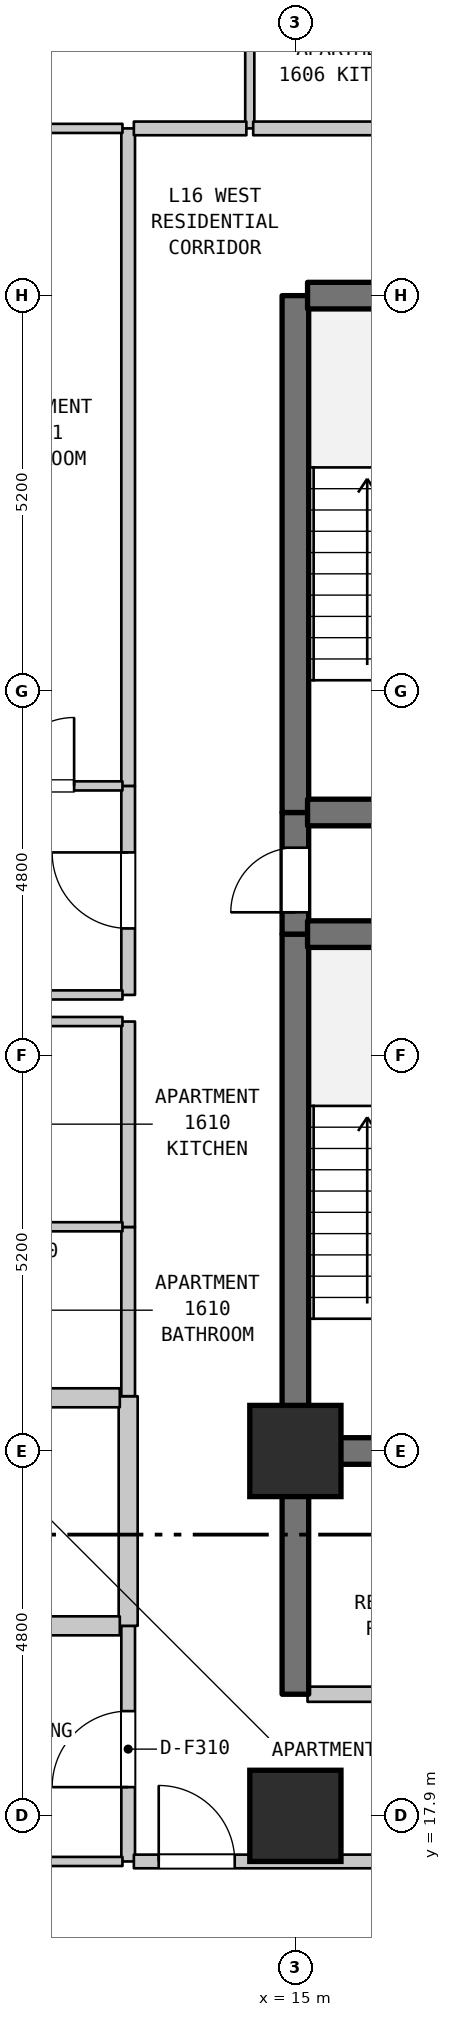
"""IFC4 building model, lengths in metres.
Left out: names, types, materials, properties, quantities, classifications, styles, units other than length and angle.
Written with IfcOpenShell. Run it as: python <this file> out.ifc"""

import sys

from ifc_helpers import new_model, si_unit, direction, frame, frame_2d, origin, origin_2d, place, context, subcontext, project, spatial, rectangle, extrude, element, fill, save


model = new_model("IFC4")
c1 = context("Model", 3, precision=1e-05, world=origin(), true_north=direction((0.0, 1.0)))
c2 = subcontext(c1, "Body", "Model", "MODEL_VIEW")
j1 = project(units=[si_unit("LENGTHUNIT", "METRE"), si_unit("PLANEANGLEUNIT", "RADIAN")], contexts=[c1])
p1 = place(None, origin())
s1 = spatial("IfcSite", under=j1, at=p1, CompositionType="ELEMENT")
p2 = place(p1, origin())
s2 = spatial("IfcBuilding", under=s1, at=p2, CompositionType="ELEMENT")
p3 = place(p2, frame((0.0, 0.0, 70.1)))
s3 = spatial("IfcBuildingStorey", under=s2, at=p3, CompositionType="ELEMENT", Elevation=70.1)
for number, where, z_axis, x_axis in (
    (1, (15.0, 17.9, 0.0), (0.0, 0.0, 1.0), (1.0, 0.0, 0.0)),
    (2, (15.0, 22.7, 0.0), (0.0, 0.0, 1.0), (1.0, 0.0, 0.0)),
):
    element("IfcColumn", number, at=place(p3, frame(where, z_axis=z_axis, x_axis=x_axis)), inside=s3, PredefinedType="COLUMN", context=c2, shape_type="SweptSolid", body=[
        extrude(rectangle(XDim=1.2, YDim=1.2, at=origin_2d()), origin(), (0.0, 0.0, 1.0), 3.7),
    ])
p4 = place(p3, frame((12.8, 17.3, 0.0), z_axis=(0.0, 0.0, 1.0), x_axis=(0.0, 1.0, 0.0)))
e3 = element("IfcWall", 3, at=p4, inside=s3, PredefinedType="STANDARD", context=c2, shape_type="SweptSolid", body=[
    extrude(rectangle(XDim=3.1, YDim=0.18, at=frame_2d((1.55, 0.0))), origin(), (0.0, 0.0, 1.0), 3.385),
])
p5 = place(p4, frame((0.978, 0.0, 0.0)))
e4 = element("IfcOpeningElement", 4, at=p5, cuts=e3, PredefinedType="OPENING", context=c2, shape_type="SweptSolid", body=[
    extrude(rectangle(XDim=1.0, YDim=2.15, at=frame_2d((0.5, 1.075))), frame((0.0, 0.1, 0.0), z_axis=(0.0, -1.0, 0.0), x_axis=(1.0, 0.0, 0.0)), (0.0, 0.0, 1.0), 0.2),
])
p6 = place(p3, frame((12.8, 20.4, 0.0), z_axis=(0.0, 0.0, 1.0), x_axis=(0.0, 1.0, 0.0)))
e5 = element("IfcWall", 5, at=p6, inside=s3, PredefinedType="STANDARD", context=c2, shape_type="SweptSolid", body=[
    extrude(rectangle(XDim=3.021, YDim=0.25, at=frame_2d((1.51, 0.0))), origin(), (0.0, 0.0, 1.0), 3.385),
])
p7 = place(p3, frame((12.8, 23.421, 0.0), z_axis=(0.0, 0.0, 1.0), x_axis=(0.0, 1.0, 0.0)))
e6 = element("IfcWall", 6, at=p7, inside=s3, PredefinedType="STANDARD", context=c2, shape_type="SweptSolid", body=[
    extrude(rectangle(XDim=2.226, YDim=0.18, at=frame_2d((1.113, 0.0))), origin(), (0.0, 0.0, 1.0), 3.385),
])
p8 = place(p3, frame((12.8, 25.647, 0.0), z_axis=(0.0, 0.0, 1.0), x_axis=(0.0, 1.0, 0.0)))
e7 = element("IfcWall", 7, at=p8, inside=s3, PredefinedType="STANDARD", context=c2, shape_type="SweptSolid", body=[
    extrude(rectangle(XDim=2.703, YDim=0.18, at=frame_2d((1.352, 0.0))), origin(), (0.0, 0.0, 1.0), 3.385),
])
p9 = place(p3, frame((12.8, 28.7, 0.0), z_axis=(0.0, 0.0, 1.0), x_axis=(0.0, 1.0, 0.0)))
e8 = element("IfcWall", 8, at=p9, inside=s3, PredefinedType="STANDARD", context=c2, shape_type="SweptSolid", body=[
    extrude(rectangle(XDim=2.75, YDim=0.18, at=frame_2d((1.375, 0.0))), origin(), (0.0, 0.0, 1.0), 3.385),
])
p10 = place(p9, frame((0.875, 0.0, 0.0)))
e9 = element("IfcOpeningElement", 9, at=p10, cuts=e8, PredefinedType="OPENING", context=c2, shape_type="SweptSolid", body=[
    extrude(rectangle(XDim=1.0, YDim=2.15, at=frame_2d((0.5, 1.075))), frame((0.0, 0.1, 0.0), z_axis=(0.0, -1.0, 0.0), x_axis=(1.0, 0.0, 0.0)), (0.0, 0.0, 1.0), 0.2),
])
p11 = place(p3, frame((12.8, 31.45, 0.0), z_axis=(0.0, 0.0, 1.0), x_axis=(0.0, 1.0, 0.0)))
e10 = element("IfcWall", 10, at=p11, inside=s3, PredefinedType="STANDARD", context=c2, shape_type="SweptSolid", body=[
    extrude(rectangle(XDim=8.65, YDim=0.18, at=frame_2d((4.325, 0.0))), origin(), (0.0, 0.0, 1.0), 3.385),
])
p12 = place(p3, frame((14.4, 40.1, 0.0), z_axis=(0.0, 0.0, 1.0), x_axis=(0.0, 1.0, 0.0)))
e11 = element("IfcWall", 11, at=p12, inside=s3, PredefinedType="PARTITIONING", context=c2, shape_type="SweptSolid", body=[
    extrude(rectangle(XDim=2.3, YDim=0.12, at=frame_2d((1.15, 0.0))), origin(), (0.0, 0.0, 1.0), 3.385),
])
p13 = place(p3, frame((15.0, 19.5, 0.0), z_axis=(0.0, 0.0, 1.0), x_axis=(0.0, 1.0, 0.0)))
e12 = element("IfcWall", 12, at=p13, inside=s3, PredefinedType="SHEAR", context=c2, shape_type="SweptSolid", body=[
    extrude(rectangle(XDim=3.2, YDim=0.35, at=frame_2d((1.6, 0.0))), origin(), (0.0, 0.0, 1.0), 3.385),
])
p14 = place(p3, frame((15.0, 22.7, 0.0), z_axis=(0.0, 0.0, 1.0), x_axis=(0.0, 1.0, 0.0)))
e13 = element("IfcWall", 13, at=p14, inside=s3, PredefinedType="SHEAR", context=c2, shape_type="SweptSolid", body=[
    extrude(rectangle(XDim=6.8, YDim=0.35, at=frame_2d((3.4, 0.0))), origin(), (0.0, 0.0, 1.0), 3.385),
])
p15 = place(p3, frame((15.0, 29.5, 0.0), z_axis=(0.0, 0.0, 1.0), x_axis=(0.0, 1.0, 0.0)))
e14 = element("IfcWall", 14, at=p15, inside=s3, PredefinedType="SHEAR", context=c2, shape_type="SweptSolid", body=[
    extrude(rectangle(XDim=1.6, YDim=0.35, at=frame_2d((0.8, 0.0))), origin(), (0.0, 0.0, 1.0), 3.385),
])
p16 = place(p15, frame((0.287, 0.0, 0.0)))
e15 = element("IfcOpeningElement", 15, at=p16, cuts=e14, PredefinedType="OPENING", context=c2, shape_type="SweptSolid", body=[
    extrude(rectangle(XDim=0.85, YDim=2.1, at=frame_2d((0.425, 1.05))), frame((0.0, 0.185, 0.0), z_axis=(0.0, -1.0, 0.0), x_axis=(1.0, 0.0, 0.0)), (0.0, 0.0, 1.0), 0.37),
])
p17 = place(p3, frame((15.0, 31.1, 0.0), z_axis=(0.0, 0.0, 1.0), x_axis=(0.0, 1.0, 0.0)))
e16 = element("IfcWall", 16, at=p17, inside=s3, PredefinedType="SHEAR", context=c2, shape_type="SweptSolid", body=[
    extrude(rectangle(XDim=6.8, YDim=0.35, at=frame_2d((3.4, 0.0))), origin(), (0.0, 0.0, 1.0), 3.385),
])
p18 = place(p3, frame((9.085, 17.3, 0.0), z_axis=(0.0, 0.0, 1.0), x_axis=(1.0, 0.0, 0.0)))
e17 = element("IfcWall", 17, at=p18, inside=s3, PredefinedType="PARTITIONING", context=c2, shape_type="SweptSolid", body=[
    extrude(rectangle(XDim=3.64, YDim=0.12, at=frame_2d((1.82, 0.0))), origin(), (0.0, 0.0, 1.0), 3.385),
])
p19 = place(p3, frame((12.875, 17.3, 0.0), z_axis=(0.0, 0.0, 1.0), x_axis=(1.0, 0.0, 0.0)))
e18 = element("IfcWall", 18, at=p19, inside=s3, PredefinedType="STANDARD", context=c2, shape_type="SweptSolid", body=[
    extrude(rectangle(XDim=3.58, YDim=0.18, at=frame_2d((1.79, 0.0))), origin(), (0.0, 0.0, 1.0), 3.385),
])
p20 = place(p19, frame((0.327, 0.0, 0.0)))
e19 = element("IfcOpeningElement", 19, at=p20, cuts=e18, PredefinedType="OPENING", context=c2, shape_type="SweptSolid", body=[
    extrude(rectangle(XDim=1.0, YDim=2.15, at=frame_2d((0.5, 1.075))), frame((0.0, 0.1, 0.0), z_axis=(0.0, -1.0, 0.0), x_axis=(1.0, 0.0, 0.0)), (0.0, 0.0, 1.0), 0.2),
])
p21 = place(p3, frame((15.16, 19.5, 0.0), z_axis=(0.0, 0.0, 1.0), x_axis=(1.0, 0.0, 0.0)))
e20 = element("IfcWall", 20, at=p21, inside=s3, PredefinedType="STANDARD", context=c2, shape_type="SweptSolid", body=[
    extrude(rectangle(XDim=3.68, YDim=0.2, at=frame_2d((1.84, 0.0))), origin(), (0.0, 0.0, 1.0), 3.385),
])
p22 = place(p21, frame((1.39, 0.0, 0.0)))
e21 = element("IfcOpeningElement", 21, at=p22, cuts=e20, PredefinedType="OPENING", context=c2, shape_type="SweptSolid", body=[
    extrude(rectangle(XDim=0.9, YDim=2.15, at=frame_2d((0.45, 1.075))), frame((0.0, 0.11, 0.0), z_axis=(0.0, -1.0, 0.0), x_axis=(1.0, 0.0, 0.0)), (0.0, 0.0, 1.0), 0.22),
])
p23 = place(p3, frame((10.66, 20.4, 0.0), z_axis=(0.0, 0.0, 1.0), x_axis=(1.0, 0.0, 0.0)))
e22 = element("IfcWall", 22, at=p23, inside=s3, PredefinedType="STANDARD", context=c2, shape_type="SweptSolid", body=[
    extrude(rectangle(XDim=2.03, YDim=0.25, at=frame_2d((1.015, 0.0))), origin(), (0.0, 0.0, 1.0), 3.385),
])
p24 = place(p3, frame((15.16, 22.7, 0.0), z_axis=(0.0, 0.0, 1.0), x_axis=(1.0, 0.0, 0.0)))
e23 = element("IfcWall", 23, at=p24, inside=s3, PredefinedType="SHEAR", context=c2, shape_type="SweptSolid", body=[
    extrude(rectangle(XDim=3.68, YDim=0.35, at=frame_2d((1.84, 0.0))), origin(), (0.0, 0.0, 1.0), 3.385),
])
p25 = place(p3, frame((10.66, 23.4, 0.0), z_axis=(0.0, 0.0, 1.0), x_axis=(1.0, 0.0, 0.0)))
e24 = element("IfcWall", 24, at=p25, inside=s3, PredefinedType="STANDARD", context=c2, shape_type="SweptSolid", body=[
    extrude(rectangle(XDim=2.03, YDim=0.25, at=frame_2d((1.015, 0.0))), origin(), (0.0, 0.0, 1.0), 3.385),
])
for number, where, z_axis, x_axis in (
    (25, (10.595, 25.65, 0.0), (0.0, 0.0, 1.0), (1.0, 0.0, 0.0)),
    (26, (10.595, 28.35, 0.0), (0.0, 0.0, 1.0), (1.0, 0.0, 0.0)),
):
    element("IfcWall", number, at=place(p3, frame(where, z_axis=z_axis, x_axis=x_axis)), inside=s3, PredefinedType="PARTITIONING", context=c2, shape_type="SweptSolid", body=[
        extrude(rectangle(XDim=2.13, YDim=0.12, at=frame_2d((1.065, 0.0))), origin(), (0.0, 0.0, 1.0), 3.385),
    ])
p26 = place(p3, frame((9.03, 28.7, 0.0), z_axis=(0.0, 0.0, 1.0), x_axis=(1.0, 0.0, 0.0)))
e27 = element("IfcWall", 27, at=p26, inside=s3, PredefinedType="PARTITIONING", context=c2, shape_type="SweptSolid", body=[
    extrude(rectangle(XDim=3.695, YDim=0.12, at=frame_2d((1.848, 0.0))), origin(), (0.0, 0.0, 1.0), 3.385),
])
for number, where, z_axis, x_axis in (
    (28, (15.16, 29.5, 0.0), (0.0, 0.0, 1.0), (1.0, 0.0, 0.0)),
    (29, (15.16, 31.1, 0.0), (0.0, 0.0, 1.0), (1.0, 0.0, 0.0)),
):
    element("IfcWall", number, at=place(p3, frame(where, z_axis=z_axis, x_axis=x_axis)), inside=s3, PredefinedType="SHEAR", context=c2, shape_type="SweptSolid", body=[
        extrude(rectangle(XDim=3.68, YDim=0.35, at=frame_2d((1.84, 0.0))), origin(), (0.0, 0.0, 1.0), 3.385),
    ])
p27 = place(p3, frame((10.523, 31.45, 0.0), z_axis=(0.0, 0.0, 1.0), x_axis=(1.0, 0.0, 0.0)))
e30 = element("IfcWall", 30, at=p27, inside=s3, PredefinedType="PARTITIONING", context=c2, shape_type="SweptSolid", body=[
    extrude(rectangle(XDim=2.202, YDim=0.12, at=frame_2d((1.101, 0.0))), origin(), (0.0, 0.0, 1.0), 3.385),
])
p28 = place(p27, frame((0.666, 0.0, 0.0)))
e31 = element("IfcOpeningElement", 31, at=p28, cuts=e30, PredefinedType="OPENING", context=c2, shape_type="SweptSolid", body=[
    extrude(rectangle(XDim=0.9, YDim=2.1, at=frame_2d((0.45, 1.05))), frame((0.0, 0.07, 0.0), z_axis=(0.0, -1.0, 0.0), x_axis=(1.0, 0.0, 0.0)), (0.0, 0.0, 1.0), 0.14),
])
p29 = place(p3, frame((15.16, 37.9, 0.0), z_axis=(0.0, 0.0, 1.0), x_axis=(1.0, 0.0, 0.0)))
e32 = element("IfcWall", 32, at=p29, inside=s3, PredefinedType="SHEAR", context=c2, shape_type="SweptSolid", body=[
    extrude(rectangle(XDim=3.68, YDim=0.35, at=frame_2d((1.84, 0.0))), origin(), (0.0, 0.0, 1.0), 3.385),
])
p30 = place(p3, frame((10.523, 40.1, 0.0), z_axis=(0.0, 0.0, 1.0), x_axis=(1.0, 0.0, 0.0)))
e33 = element("IfcWall", 33, at=p30, inside=s3, PredefinedType="PARTITIONING", context=c2, shape_type="SweptSolid", body=[
    extrude(rectangle(XDim=2.202, YDim=0.12, at=frame_2d((1.101, 0.0))), origin(), (0.0, 0.0, 1.0), 3.385),
])
p31 = place(p3, frame((12.875, 40.1, 0.0), z_axis=(0.0, 0.0, 1.0), x_axis=(1.0, 0.0, 0.0)))
e34 = element("IfcWall", 34, at=p31, inside=s3, PredefinedType="STANDARD", context=c2, shape_type="SweptSolid", body=[
    extrude(rectangle(XDim=1.48, YDim=0.18, at=frame_2d((0.74, 0.0))), origin(), (0.0, 0.0, 1.0), 3.385),
])
p32 = place(p3, frame((14.445, 40.1, 0.0), z_axis=(0.0, 0.0, 1.0), x_axis=(1.0, 0.0, 0.0)))
e35 = element("IfcWall", 35, at=p32, inside=s3, PredefinedType="STANDARD", context=c2, shape_type="SweptSolid", body=[
    extrude(rectangle(XDim=2.486, YDim=0.18, at=frame_2d((1.243, 0.0))), origin(), (0.0, 0.0, 1.0), 3.385),
])
p33 = place(p5, origin())
e36 = element("IfcDoor", 36, at=p33, inside=s3, OperationType="SINGLE_SWING_LEFT", PredefinedType="DOOR", context=c2, shape_type="SweptSolid", body=[
    extrude(rectangle(XDim=1.0, YDim=2.15, at=frame_2d((0.5, 1.075))), frame((0.0, 0.025, 0.0), z_axis=(0.0, -1.0, 0.0), x_axis=(1.0, 0.0, 0.0)), (0.0, 0.0, 1.0), 0.05),
])
fill(e4, e36)
p34 = place(p10, origin())
e37 = element("IfcDoor", 37, at=p34, inside=s3, OperationType="SINGLE_SWING_RIGHT", PredefinedType="DOOR", context=c2, shape_type="SweptSolid", body=[
    extrude(rectangle(XDim=1.0, YDim=2.15, at=frame_2d((0.5, 1.075))), frame((0.0, 0.025, 0.0), z_axis=(0.0, -1.0, 0.0), x_axis=(1.0, 0.0, 0.0)), (0.0, 0.0, 1.0), 0.05),
])
fill(e9, e37)
p35 = place(p16, origin())
e38 = element("IfcDoor", 38, at=p35, inside=s3, OperationType="SINGLE_SWING_LEFT", PredefinedType="DOOR", context=c2, shape_type="SweptSolid", body=[
    extrude(rectangle(XDim=0.85, YDim=2.1, at=frame_2d((0.425, 1.05))), frame((0.0, 0.025, 0.0), z_axis=(0.0, -1.0, 0.0), x_axis=(1.0, 0.0, 0.0)), (0.0, 0.0, 1.0), 0.05),
])
fill(e15, e38)
p36 = place(p20, origin())
e39 = element("IfcDoor", 39, at=p36, inside=s3, OperationType="SINGLE_SWING_LEFT", PredefinedType="DOOR", context=c2, shape_type="SweptSolid", body=[
    extrude(rectangle(XDim=1.0, YDim=2.15, at=frame_2d((0.5, 1.075))), frame((0.0, 0.025, 0.0), z_axis=(0.0, -1.0, 0.0), x_axis=(1.0, 0.0, 0.0)), (0.0, 0.0, 1.0), 0.05),
])
fill(e19, e39)
p37 = place(p28, origin())
e40 = element("IfcDoor", 40, at=p37, inside=s3, OperationType="SINGLE_SWING_RIGHT", PredefinedType="DOOR", context=c2, shape_type="SweptSolid", body=[
    extrude(rectangle(XDim=0.9, YDim=2.1, at=frame_2d((0.45, 1.05))), frame((0.0, 0.025, 0.0), z_axis=(0.0, -1.0, 0.0), x_axis=(1.0, 0.0, 0.0)), (0.0, 0.0, 1.0), 0.05),
])
fill(e31, e40)
save(model, sys.argv[1])
